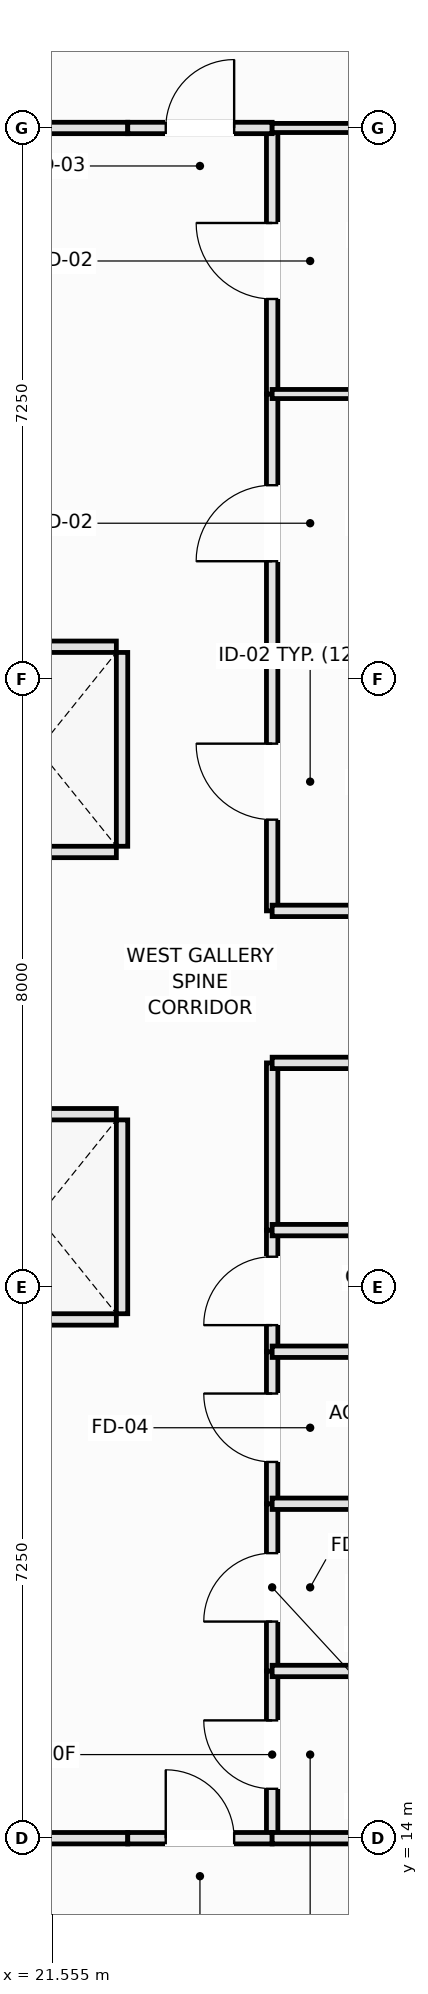
"""IFC4 building model, lengths in metres.
Left out: names, types, materials, properties, quantities, classifications, styles, units other than length and angle.
Written with IfcOpenShell. Run it as: python <this file> out.ifc"""

import sys

from ifc_helpers import new_model, si_unit, direction, frame, frame_2d, origin, place, context, subcontext, project, spatial, rectangle, extrude, element, fill, save


model = new_model("IFC4")
c1 = context("Model", 3, precision=1e-05, world=origin(), true_north=direction((0.0, 1.0)))
c2 = subcontext(c1, "Body", "Model", "MODEL_VIEW")
j1 = project(units=[si_unit("LENGTHUNIT", "METRE"), si_unit("PLANEANGLEUNIT", "RADIAN")], contexts=[c1])
p1 = place(None, origin())
s1 = spatial("IfcSite", under=j1, at=p1, CompositionType="ELEMENT")
p2 = place(p1, origin())
s2 = spatial("IfcBuilding", under=s1, at=p2, CompositionType="ELEMENT")
p3 = place(p2, frame((0.0, 0.0, 102.25)))
s3 = spatial("IfcBuildingStorey", under=s2, at=p3, CompositionType="ELEMENT", Elevation=102.25)
for number, where, z_axis, x_axis in (
    (1, (20.35, 20.825, 0.0), (0.0, 0.0, 1.0), (1.0, 0.0, 0.0)),
    (2, (20.35, 23.525, 0.0), (0.0, 0.0, 1.0), (1.0, 0.0, 0.0)),
):
    element("IfcWall", number, at=place(p3, frame(where, z_axis=z_axis, x_axis=x_axis)), inside=s3, PredefinedType="PARTITIONING", context=c2, shape_type="SweptSolid", body=[
        extrude(rectangle(XDim=2.05, YDim=0.15, at=frame_2d((1.025, 0.0))), origin(), (0.0, 0.0, 1.0), 3.37),
    ])
p4 = place(p3, frame((22.475, 20.9, 0.0), z_axis=(0.0, 0.0, 1.0), x_axis=(0.0, 1.0, 0.0)))
e3 = element("IfcWall", 3, at=p4, inside=s3, PredefinedType="PARTITIONING", context=c2, shape_type="SweptSolid", body=[
    extrude(rectangle(XDim=2.55, YDim=0.15, at=frame_2d((1.275, 0.0))), origin(), (0.0, 0.0, 1.0), 3.37),
])
for number, where, z_axis, x_axis in (
    (4, (20.35, 26.975, 0.0), (0.0, 0.0, 1.0), (1.0, 0.0, 0.0)),
    (5, (20.35, 29.675, 0.0), (0.0, 0.0, 1.0), (1.0, 0.0, 0.0)),
):
    element("IfcWall", number, at=place(p3, frame(where, z_axis=z_axis, x_axis=x_axis)), inside=s3, PredefinedType="PARTITIONING", context=c2, shape_type="SweptSolid", body=[
        extrude(rectangle(XDim=2.05, YDim=0.15, at=frame_2d((1.025, 0.0))), origin(), (0.0, 0.0, 1.0), 3.37),
    ])
p5 = place(p3, frame((22.475, 27.05, 0.0), z_axis=(0.0, 0.0, 1.0), x_axis=(0.0, 1.0, 0.0)))
e6 = element("IfcWall", 6, at=p5, inside=s3, PredefinedType="PARTITIONING", context=c2, shape_type="SweptSolid", body=[
    extrude(rectangle(XDim=2.55, YDim=0.15, at=frame_2d((1.275, 0.0))), origin(), (0.0, 0.0, 1.0), 3.37),
])
for number, where, z_axis, x_axis in (
    (7, (18.0, 14.0, 0.0), (0.0, 0.0, 1.0), (1.0, 0.0, 0.0)),
    (8, (18.0, 36.5, 0.0), (0.0, 0.0, 1.0), (1.0, 0.0, 0.0)),
):
    element("IfcWall", number, at=place(p3, frame(where, z_axis=z_axis, x_axis=x_axis)), inside=s3, PredefinedType="PARTITIONING", context=c2, shape_type="SweptSolid", body=[
        extrude(rectangle(XDim=4.55, YDim=0.15, at=frame_2d((2.275, 0.0))), origin(), (0.0, 0.0, 1.0), 3.37),
    ])
p6 = place(p3, frame((24.45, 14.0, 0.0), z_axis=(0.0, 0.0, 1.0), x_axis=(0.0, 1.0, 0.0)))
e9 = element("IfcWall", 9, at=p6, inside=s3, PredefinedType="PLUMBINGWALL", context=c2, shape_type="SweptSolid", body=[
    extrude(rectangle(XDim=2.2, YDim=0.15, at=frame_2d((1.1, 0.0))), origin(), (0.0, 0.0, 1.0), 3.37),
])
p7 = place(p6, frame((0.65, 0.0, 0.0)))
e10 = element("IfcOpeningElement", 10, at=p7, cuts=e9, PredefinedType="OPENING", context=c2, shape_type="SweptSolid", body=[
    extrude(rectangle(XDim=0.9, YDim=2.1, at=frame_2d((0.45, 1.05))), frame((0.0, 0.085, 0.0), z_axis=(0.0, -1.0, 0.0), x_axis=(1.0, 0.0, 0.0)), (0.0, 0.0, 1.0), 0.17),
])
p8 = place(p3, frame((24.45, 16.2, 0.0), z_axis=(0.0, 0.0, 1.0), x_axis=(0.0, 1.0, 0.0)))
e11 = element("IfcWall", 11, at=p8, inside=s3, PredefinedType="PLUMBINGWALL", context=c2, shape_type="SweptSolid", body=[
    extrude(rectangle(XDim=2.2, YDim=0.15, at=frame_2d((1.1, 0.0))), origin(), (0.0, 0.0, 1.0), 3.37),
])
p9 = place(p8, frame((0.65, 0.0, 0.0)))
e12 = element("IfcOpeningElement", 12, at=p9, cuts=e11, PredefinedType="OPENING", context=c2, shape_type="SweptSolid", body=[
    extrude(rectangle(XDim=0.9, YDim=2.1, at=frame_2d((0.45, 1.05))), frame((0.0, 0.085, 0.0), z_axis=(0.0, -1.0, 0.0), x_axis=(1.0, 0.0, 0.0)), (0.0, 0.0, 1.0), 0.17),
])
p10 = place(p3, frame((24.45, 18.4, 0.0), z_axis=(0.0, 0.0, 1.0), x_axis=(0.0, 1.0, 0.0)))
e13 = element("IfcWall", 13, at=p10, inside=s3, PredefinedType="PLUMBINGWALL", context=c2, shape_type="SweptSolid", body=[
    extrude(rectangle(XDim=2.0, YDim=0.15, at=frame_2d((1.0, 0.0))), origin(), (0.0, 0.0, 1.0), 3.37),
])
p11 = place(p10, frame((0.55, 0.0, 0.0)))
e14 = element("IfcOpeningElement", 14, at=p11, cuts=e13, PredefinedType="OPENING", context=c2, shape_type="SweptSolid", body=[
    extrude(rectangle(XDim=0.9, YDim=2.1, at=frame_2d((0.45, 1.05))), frame((0.0, 0.085, 0.0), z_axis=(0.0, -1.0, 0.0), x_axis=(1.0, 0.0, 0.0)), (0.0, 0.0, 1.0), 0.17),
])
p12 = place(p3, frame((24.45, 20.4, 0.0), z_axis=(0.0, 0.0, 1.0), x_axis=(0.0, 1.0, 0.0)))
e15 = element("IfcWall", 15, at=p12, inside=s3, PredefinedType="PLUMBINGWALL", context=c2, shape_type="SweptSolid", body=[
    extrude(rectangle(XDim=1.6, YDim=0.15, at=frame_2d((0.8, 0.0))), origin(), (0.0, 0.0, 1.0), 3.37),
])
p13 = place(p12, frame((0.35, 0.0, 0.0)))
e16 = element("IfcOpeningElement", 16, at=p13, cuts=e15, PredefinedType="OPENING", context=c2, shape_type="SweptSolid", body=[
    extrude(rectangle(XDim=0.9, YDim=2.1, at=frame_2d((0.45, 1.05))), frame((0.0, 0.085, 0.0), z_axis=(0.0, -1.0, 0.0), x_axis=(1.0, 0.0, 0.0)), (0.0, 0.0, 1.0), 0.17),
])
p14 = place(p3, frame((24.45, 22.0, 0.0), z_axis=(0.0, 0.0, 1.0), x_axis=(0.0, 1.0, 0.0)))
e17 = element("IfcWall", 17, at=p14, inside=s3, PredefinedType="PARTITIONING", context=c2, shape_type="SweptSolid", body=[
    extrude(rectangle(XDim=2.2, YDim=0.15, at=frame_2d((1.1, 0.0))), origin(), (0.0, 0.0, 1.0), 3.37),
])
p15 = place(p3, frame((24.45, 26.2, 0.0), z_axis=(0.0, 0.0, 1.0), x_axis=(0.0, 1.0, 0.0)))
e18 = element("IfcWall", 18, at=p15, inside=s3, PredefinedType="PARTITIONING", context=c2, shape_type="SweptSolid", body=[
    extrude(rectangle(XDim=3.4, YDim=0.15, at=frame_2d((1.7, 0.0))), origin(), (0.0, 0.0, 1.0), 3.37),
])
p16 = place(p15, frame((1.2, 0.0, 0.0)))
e19 = element("IfcOpeningElement", 19, at=p16, cuts=e18, PredefinedType="OPENING", context=c2, shape_type="SweptSolid", body=[
    extrude(rectangle(XDim=1.0, YDim=2.15, at=frame_2d((0.5, 1.075))), frame((0.0, 0.085, 0.0), z_axis=(0.0, -1.0, 0.0), x_axis=(1.0, 0.0, 0.0)), (0.0, 0.0, 1.0), 0.17),
])
p17 = place(p3, frame((24.45, 29.6, 0.0), z_axis=(0.0, 0.0, 1.0), x_axis=(0.0, 1.0, 0.0)))
e20 = element("IfcWall", 20, at=p17, inside=s3, PredefinedType="PARTITIONING", context=c2, shape_type="SweptSolid", body=[
    extrude(rectangle(XDim=3.4, YDim=0.15, at=frame_2d((1.7, 0.0))), origin(), (0.0, 0.0, 1.0), 3.37),
])
p18 = place(p17, frame((1.2, 0.0, 0.0)))
e21 = element("IfcOpeningElement", 21, at=p18, cuts=e20, PredefinedType="OPENING", context=c2, shape_type="SweptSolid", body=[
    extrude(rectangle(XDim=1.0, YDim=2.15, at=frame_2d((0.5, 1.075))), frame((0.0, 0.085, 0.0), z_axis=(0.0, -1.0, 0.0), x_axis=(1.0, 0.0, 0.0)), (0.0, 0.0, 1.0), 0.17),
])
p19 = place(p3, frame((24.45, 33.0, 0.0), z_axis=(0.0, 0.0, 1.0), x_axis=(0.0, 1.0, 0.0)))
e22 = element("IfcWall", 22, at=p19, inside=s3, PredefinedType="PARTITIONING", context=c2, shape_type="SweptSolid", body=[
    extrude(rectangle(XDim=3.5, YDim=0.15, at=frame_2d((1.75, 0.0))), origin(), (0.0, 0.0, 1.0), 3.37),
])
p20 = place(p19, frame((1.25, 0.0, 0.0)))
e23 = element("IfcOpeningElement", 23, at=p20, cuts=e22, PredefinedType="OPENING", context=c2, shape_type="SweptSolid", body=[
    extrude(rectangle(XDim=1.0, YDim=2.15, at=frame_2d((0.5, 1.075))), frame((0.0, 0.085, 0.0), z_axis=(0.0, -1.0, 0.0), x_axis=(1.0, 0.0, 0.0)), (0.0, 0.0, 1.0), 0.17),
])
p21 = place(p3, frame((22.55, 14.0, 0.0), z_axis=(0.0, 0.0, 1.0), x_axis=(1.0, 0.0, 0.0)))
e24 = element("IfcWall", 24, at=p21, inside=s3, PredefinedType="PARTITIONING", context=c2, shape_type="SweptSolid", body=[
    extrude(rectangle(XDim=1.9, YDim=0.15, at=frame_2d((0.95, 0.0))), origin(), (0.0, 0.0, 1.0), 3.37),
])
p22 = place(p21, frame((0.5, 0.0, 0.0)))
e25 = element("IfcOpeningElement", 25, at=p22, cuts=e24, PredefinedType="OPENING", context=c2, shape_type="SweptSolid", body=[
    extrude(rectangle(XDim=0.9, YDim=2.1, at=frame_2d((0.45, 1.05))), frame((0.0, 0.085, 0.0), z_axis=(0.0, -1.0, 0.0), x_axis=(1.0, 0.0, 0.0)), (0.0, 0.0, 1.0), 0.17),
])
p23 = place(p3, frame((22.55, 36.5, 0.0), z_axis=(0.0, 0.0, 1.0), x_axis=(1.0, 0.0, 0.0)))
e26 = element("IfcWall", 26, at=p23, inside=s3, PredefinedType="PARTITIONING", context=c2, shape_type="SweptSolid", body=[
    extrude(rectangle(XDim=1.9, YDim=0.15, at=frame_2d((0.95, 0.0))), origin(), (0.0, 0.0, 1.0), 3.37),
])
p24 = place(p23, frame((0.5, 0.0, 0.0)))
e27 = element("IfcOpeningElement", 27, at=p24, cuts=e26, PredefinedType="OPENING", context=c2, shape_type="SweptSolid", body=[
    extrude(rectangle(XDim=0.9, YDim=2.1, at=frame_2d((0.45, 1.05))), frame((0.0, 0.085, 0.0), z_axis=(0.0, -1.0, 0.0), x_axis=(1.0, 0.0, 0.0)), (0.0, 0.0, 1.0), 0.17),
])
p25 = place(p3, frame((24.45, 24.2, 0.0), z_axis=(0.0, 0.0, 1.0), x_axis=(1.0, 0.0, 0.0)))
e28 = element("IfcWall", 28, at=p25, inside=s3, PredefinedType="PARTITIONING", context=c2, shape_type="SweptSolid", body=[
    extrude(rectangle(XDim=3.05, YDim=0.15, at=frame_2d((1.525, 0.0))), origin(), (0.0, 0.0, 1.0), 3.37),
])
p26 = place(p25, frame((1.025, 0.0, 0.0)))
e29 = element("IfcOpeningElement", 29, at=p26, cuts=e28, PredefinedType="OPENING", context=c2, shape_type="SweptSolid", body=[
    extrude(rectangle(XDim=1.0, YDim=2.15, at=frame_2d((0.5, 1.075))), frame((0.0, 0.085, 0.0), z_axis=(0.0, -1.0, 0.0), x_axis=(1.0, 0.0, 0.0)), (0.0, 0.0, 1.0), 0.17),
])
p27 = place(p3, frame((24.45, 26.2, 0.0), z_axis=(0.0, 0.0, 1.0), x_axis=(1.0, 0.0, 0.0)))
e30 = element("IfcWall", 30, at=p27, inside=s3, PredefinedType="PARTITIONING", context=c2, shape_type="SweptSolid", body=[
    extrude(rectangle(XDim=3.05, YDim=0.15, at=frame_2d((1.525, 0.0))), origin(), (0.0, 0.0, 1.0), 3.37),
])
for number, where, z_axis, x_axis in (
    (31, (24.45, 16.2, 0.0), (0.0, 0.0, 1.0), (1.0, 0.0, 0.0)),
    (32, (24.45, 14.0, 0.0), (0.0, 0.0, 1.0), (1.0, 0.0, 0.0)),
):
    element("IfcWall", number, at=place(p3, frame(where, z_axis=z_axis, x_axis=x_axis)), inside=s3, PredefinedType="PLUMBINGWALL", context=c2, shape_type="SweptSolid", body=[
        extrude(rectangle(XDim=3.05, YDim=0.15, at=frame_2d((1.525, 0.0))), origin(), (0.0, 0.0, 1.0), 3.37),
    ])
p28 = place(p3, frame((24.45, 18.4, 0.0), z_axis=(0.0, 0.0, 1.0), x_axis=(1.0, 0.0, 0.0)))
e33 = element("IfcWall", 33, at=p28, inside=s3, PredefinedType="PLUMBINGWALL", context=c2, shape_type="SweptSolid", body=[
    extrude(rectangle(XDim=3.05, YDim=0.15, at=frame_2d((1.525, 0.0))), origin(), (0.0, 0.0, 1.0), 2.77),
])
for number, where, z_axis, x_axis in (
    (34, (24.45, 20.4, 0.0), (0.0, 0.0, 1.0), (1.0, 0.0, 0.0)),
    (35, (24.45, 22.0, 0.0), (0.0, 0.0, 1.0), (1.0, 0.0, 0.0)),
):
    element("IfcWall", number, at=place(p3, frame(where, z_axis=z_axis, x_axis=x_axis)), inside=s3, PredefinedType="PLUMBINGWALL", context=c2, shape_type="SweptSolid", body=[
        extrude(rectangle(XDim=3.05, YDim=0.15, at=frame_2d((1.525, 0.0))), origin(), (0.0, 0.0, 1.0), 3.37),
    ])
for number, where, z_axis, x_axis in (
    (36, (24.45, 29.6, 0.0), (0.0, 0.0, 1.0), (1.0, 0.0, 0.0)),
    (37, (24.45, 33.0, 0.0), (0.0, 0.0, 1.0), (1.0, 0.0, 0.0)),
    (38, (24.45, 36.5, 0.0), (0.0, 0.0, 1.0), (1.0, 0.0, 0.0)),
):
    element("IfcWall", number, at=place(p3, frame(where, z_axis=z_axis, x_axis=x_axis)), inside=s3, PredefinedType="PARTITIONING", context=c2, shape_type="SweptSolid", body=[
        extrude(rectangle(XDim=3.05, YDim=0.12, at=frame_2d((1.525, 0.0))), origin(), (0.0, 0.0, 1.0), 3.37),
    ])
p29 = place(p7, origin())
e39 = element("IfcDoor", 39, at=p29, inside=s3, OperationType="SINGLE_SWING_RIGHT", PredefinedType="DOOR", context=c2, shape_type="SweptSolid", body=[
    extrude(rectangle(XDim=0.9, YDim=2.1, at=frame_2d((0.45, 1.05))), frame((0.0, 0.025, 0.0), z_axis=(0.0, -1.0, 0.0), x_axis=(1.0, 0.0, 0.0)), (0.0, 0.0, 1.0), 0.05),
])
fill(e10, e39)
p30 = place(p9, origin())
e40 = element("IfcDoor", 40, at=p30, inside=s3, OperationType="SINGLE_SWING_LEFT", PredefinedType="DOOR", context=c2, shape_type="SweptSolid", body=[
    extrude(rectangle(XDim=0.9, YDim=2.1, at=frame_2d((0.45, 1.05))), frame((0.0, 0.025, 0.0), z_axis=(0.0, -1.0, 0.0), x_axis=(1.0, 0.0, 0.0)), (0.0, 0.0, 1.0), 0.05),
])
fill(e12, e40)
p31 = place(p11, origin())
e41 = element("IfcDoor", 41, at=p31, inside=s3, OperationType="SINGLE_SWING_RIGHT", PredefinedType="DOOR", context=c2, shape_type="SweptSolid", body=[
    extrude(rectangle(XDim=0.9, YDim=2.1, at=frame_2d((0.45, 1.05))), frame((0.0, 0.025, 0.0), z_axis=(0.0, -1.0, 0.0), x_axis=(1.0, 0.0, 0.0)), (0.0, 0.0, 1.0), 0.05),
])
fill(e14, e41)
p32 = place(p13, origin())
e42 = element("IfcDoor", 42, at=p32, inside=s3, OperationType="SINGLE_SWING_LEFT", PredefinedType="DOOR", context=c2, shape_type="SweptSolid", body=[
    extrude(rectangle(XDim=0.9, YDim=2.1, at=frame_2d((0.45, 1.05))), frame((0.0, 0.025, 0.0), z_axis=(0.0, -1.0, 0.0), x_axis=(1.0, 0.0, 0.0)), (0.0, 0.0, 1.0), 0.05),
])
fill(e16, e42)
p33 = place(p16, origin())
e43 = element("IfcDoor", 43, at=p33, inside=s3, OperationType="SINGLE_SWING_RIGHT", PredefinedType="DOOR", context=c2, shape_type="SweptSolid", body=[
    extrude(rectangle(XDim=1.0, YDim=2.15, at=frame_2d((0.5, 1.075))), frame((0.0, 0.025, 0.0), z_axis=(0.0, -1.0, 0.0), x_axis=(1.0, 0.0, 0.0)), (0.0, 0.0, 1.0), 0.05),
])
fill(e19, e43)
p34 = place(p18, origin())
e44 = element("IfcDoor", 44, at=p34, inside=s3, OperationType="SINGLE_SWING_LEFT", PredefinedType="DOOR", context=c2, shape_type="SweptSolid", body=[
    extrude(rectangle(XDim=1.0, YDim=2.15, at=frame_2d((0.5, 1.075))), frame((0.0, 0.025, 0.0), z_axis=(0.0, -1.0, 0.0), x_axis=(1.0, 0.0, 0.0)), (0.0, 0.0, 1.0), 0.05),
])
fill(e21, e44)
p35 = place(p20, origin())
e45 = element("IfcDoor", 45, at=p35, inside=s3, OperationType="SINGLE_SWING_RIGHT", PredefinedType="DOOR", context=c2, shape_type="SweptSolid", body=[
    extrude(rectangle(XDim=1.0, YDim=2.15, at=frame_2d((0.5, 1.075))), frame((0.0, 0.025, 0.0), z_axis=(0.0, -1.0, 0.0), x_axis=(1.0, 0.0, 0.0)), (0.0, 0.0, 1.0), 0.05),
])
fill(e23, e45)
p36 = place(p22, origin())
e46 = element("IfcDoor", 46, at=p36, inside=s3, OperationType="SINGLE_SWING_LEFT", PredefinedType="DOOR", context=c2, shape_type="SweptSolid", body=[
    extrude(rectangle(XDim=0.9, YDim=2.1, at=frame_2d((0.45, 1.05))), frame((0.0, 0.025, 0.0), z_axis=(0.0, -1.0, 0.0), x_axis=(1.0, 0.0, 0.0)), (0.0, 0.0, 1.0), 0.05),
])
fill(e25, e46)
p37 = place(p24, origin())
e47 = element("IfcDoor", 47, at=p37, inside=s3, OperationType="SINGLE_SWING_RIGHT", PredefinedType="DOOR", context=c2, shape_type="SweptSolid", body=[
    extrude(rectangle(XDim=0.9, YDim=2.1, at=frame_2d((0.45, 1.05))), frame((0.0, 0.025, 0.0), z_axis=(0.0, -1.0, 0.0), x_axis=(1.0, 0.0, 0.0)), (0.0, 0.0, 1.0), 0.05),
])
fill(e27, e47)
save(model, sys.argv[1])
